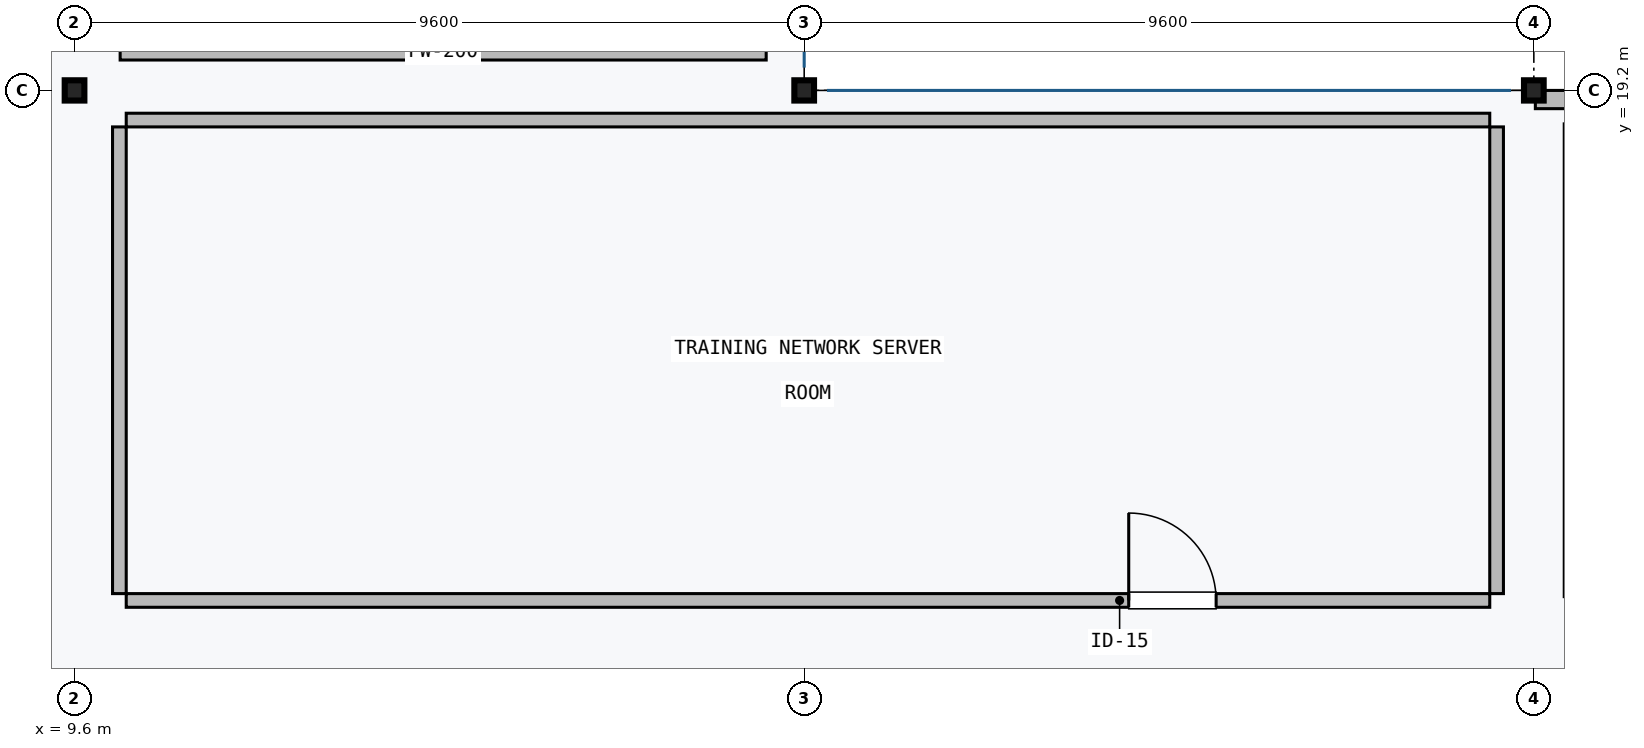
"""IFC4 building model, lengths in metres.
Left out: names, types, materials, properties, quantities, classifications, styles, units other than length and angle.
Written with IfcOpenShell. Run it as: python <this file> out.ifc"""

import sys

from ifc_helpers import new_model, si_unit, direction, frame, frame_2d, origin, origin_2d, place, context, subcontext, project, spatial, rectangle, i_section, extrude, element, fill, save


model = new_model("IFC4")
c1 = context("Model", 3, precision=1e-05, world=origin(), true_north=direction((0.0, 1.0)))
c2 = subcontext(c1, "Body", "Model", "MODEL_VIEW")
j1 = project(units=[si_unit("LENGTHUNIT", "METRE"), si_unit("PLANEANGLEUNIT", "RADIAN")], contexts=[c1])
p1 = place(None, origin())
s1 = spatial("IfcSite", under=j1, at=p1, CompositionType="ELEMENT")
p2 = place(p1, origin())
s2 = spatial("IfcBuilding", under=s1, at=p2, CompositionType="ELEMENT")
p3 = place(p2, frame((0.0, 0.0, 18.9)))
s3 = spatial("IfcBuildingStorey", under=s2, at=p3, CompositionType="ELEMENT", Elevation=18.9)
for number, where, z_axis, x_axis in (
    (1, (9.6, 19.2, 0.0), (0.0, 0.0, 1.0), (1.0, 0.0, 0.0)),
    (2, (19.2, 19.2, 0.0), (0.0, 0.0, 1.0), (1.0, 0.0, 0.0)),
    (3, (28.8, 19.2, 0.0), (0.0, 0.0, 1.0), (1.0, 0.0, 0.0)),
):
    element("IfcColumn", number, at=place(p3, frame(where, z_axis=z_axis, x_axis=x_axis)), inside=s3, PredefinedType="COLUMN", context=c2, shape_type="SweptSolid", body=[
        extrude(i_section(OverallWidth=0.259, OverallDepth=0.267, WebThickness=0.013, FlangeThickness=0.021, FilletRadius=0.013, at=origin_2d()), origin(), (0.0, 0.0, 1.0), 3.95),
    ])
p4 = place(p3, frame((28.82, 19.08, 0.0), z_axis=(0.0, 0.0, 1.0), x_axis=(1.0, 0.0, 0.0)))
e4 = element("IfcWall", 4, at=p4, inside=s3, PredefinedType="SOLIDWALL", context=c2, shape_type="SweptSolid", body=[
    extrude(rectangle(XDim=9.56, YDim=0.24, at=frame_2d((4.78, 0.0))), origin(), (0.0, 0.0, 1.0), 3.66),
])
p5 = place(p4, frame((4.03, 0.0, 0.9)))
e5 = element("IfcOpeningElement", 5, at=p5, cuts=e4, PredefinedType="OPENING", context=c2, shape_type="SweptSolid", body=[
    extrude(rectangle(XDim=1.5, YDim=1.5, at=frame_2d((0.75, 0.75))), frame((0.0, 0.13, 0.0), z_axis=(0.0, -1.0, 0.0), x_axis=(1.0, 0.0, 0.0)), (0.0, 0.0, 1.0), 0.26),
])
p6 = place(p3, frame((18.7, 19.7, 0.0), z_axis=(0.0, 0.0, 1.0), x_axis=(-1.0, 0.0, 0.0)))
e6 = element("IfcWall", 6, at=p6, inside=s3, PredefinedType="PARTITIONING", context=c2, shape_type="SweptSolid", body=[
    extrude(rectangle(XDim=8.5, YDim=0.2, at=frame_2d((4.25, 0.0))), origin(), (0.0, 0.0, 1.0), 3.59),
])
p7 = place(p3, frame((28.22, 12.49, 0.0), z_axis=(0.0, 0.0, 1.0), x_axis=(-1.0, 0.0, 0.0)))
e7 = element("IfcWall", 7, at=p7, inside=s3, PredefinedType="PARTITIONING", context=c2, shape_type="SweptSolid", body=[
    extrude(rectangle(XDim=17.94, YDim=0.18, at=frame_2d((8.97, 0.0))), origin(), (0.0, 0.0, 1.0), 3.483),
])
p8 = place(p7, frame((3.6, 0.0, 0.0)))
e8 = element("IfcOpeningElement", 8, at=p8, cuts=e7, PredefinedType="OPENING", context=c2, shape_type="SweptSolid", body=[
    extrude(rectangle(XDim=1.15, YDim=2.2, at=frame_2d((0.575, 1.1))), frame((0.0, 0.1, 0.0), z_axis=(0.0, -1.0, 0.0), x_axis=(1.0, 0.0, 0.0)), (0.0, 0.0, 1.0), 0.2),
])
p9 = place(p3, frame((10.28, 18.81, 0.0), z_axis=(0.0, 0.0, 1.0), x_axis=(1.0, 0.0, 0.0)))
e9 = element("IfcWall", 9, at=p9, inside=s3, PredefinedType="PARTITIONING", context=c2, shape_type="SweptSolid", body=[
    extrude(rectangle(XDim=17.94, YDim=0.18, at=frame_2d((8.97, 0.0))), origin(), (0.0, 0.0, 1.0), 3.483),
])
for number, where, z_axis, x_axis in (
    (10, (10.19, 12.58, 0.0), (0.0, 0.0, 1.0), (0.0, 1.0, 0.0)),
    (11, (28.31, 18.72, 0.0), (0.0, 0.0, 1.0), (0.0, -1.0, 0.0)),
):
    element("IfcWall", number, at=place(p3, frame(where, z_axis=z_axis, x_axis=x_axis)), inside=s3, PredefinedType="PARTITIONING", context=c2, shape_type="SweptSolid", body=[
        extrude(rectangle(XDim=6.14, YDim=0.18, at=frame_2d((3.07, 0.0))), origin(), (0.0, 0.0, 1.0), 3.59),
    ])
p10 = place(p8, frame((1.15, 0.0, 0.0), z_axis=(0.0, 0.0, 1.0), x_axis=(-1.0, 0.0, 0.0)))
e12 = element("IfcDoor", 12, at=p10, inside=s3, OperationType="SINGLE_SWING_RIGHT", PredefinedType="DOOR", context=c2, shape_type="SweptSolid", body=[
    extrude(rectangle(XDim=1.15, YDim=2.2, at=frame_2d((0.575, 1.1))), frame((0.0, 0.025, 0.0), z_axis=(0.0, -1.0, 0.0), x_axis=(1.0, 0.0, 0.0)), (0.0, 0.0, 1.0), 0.05),
])
fill(e8, e12)
save(model, sys.argv[1])
